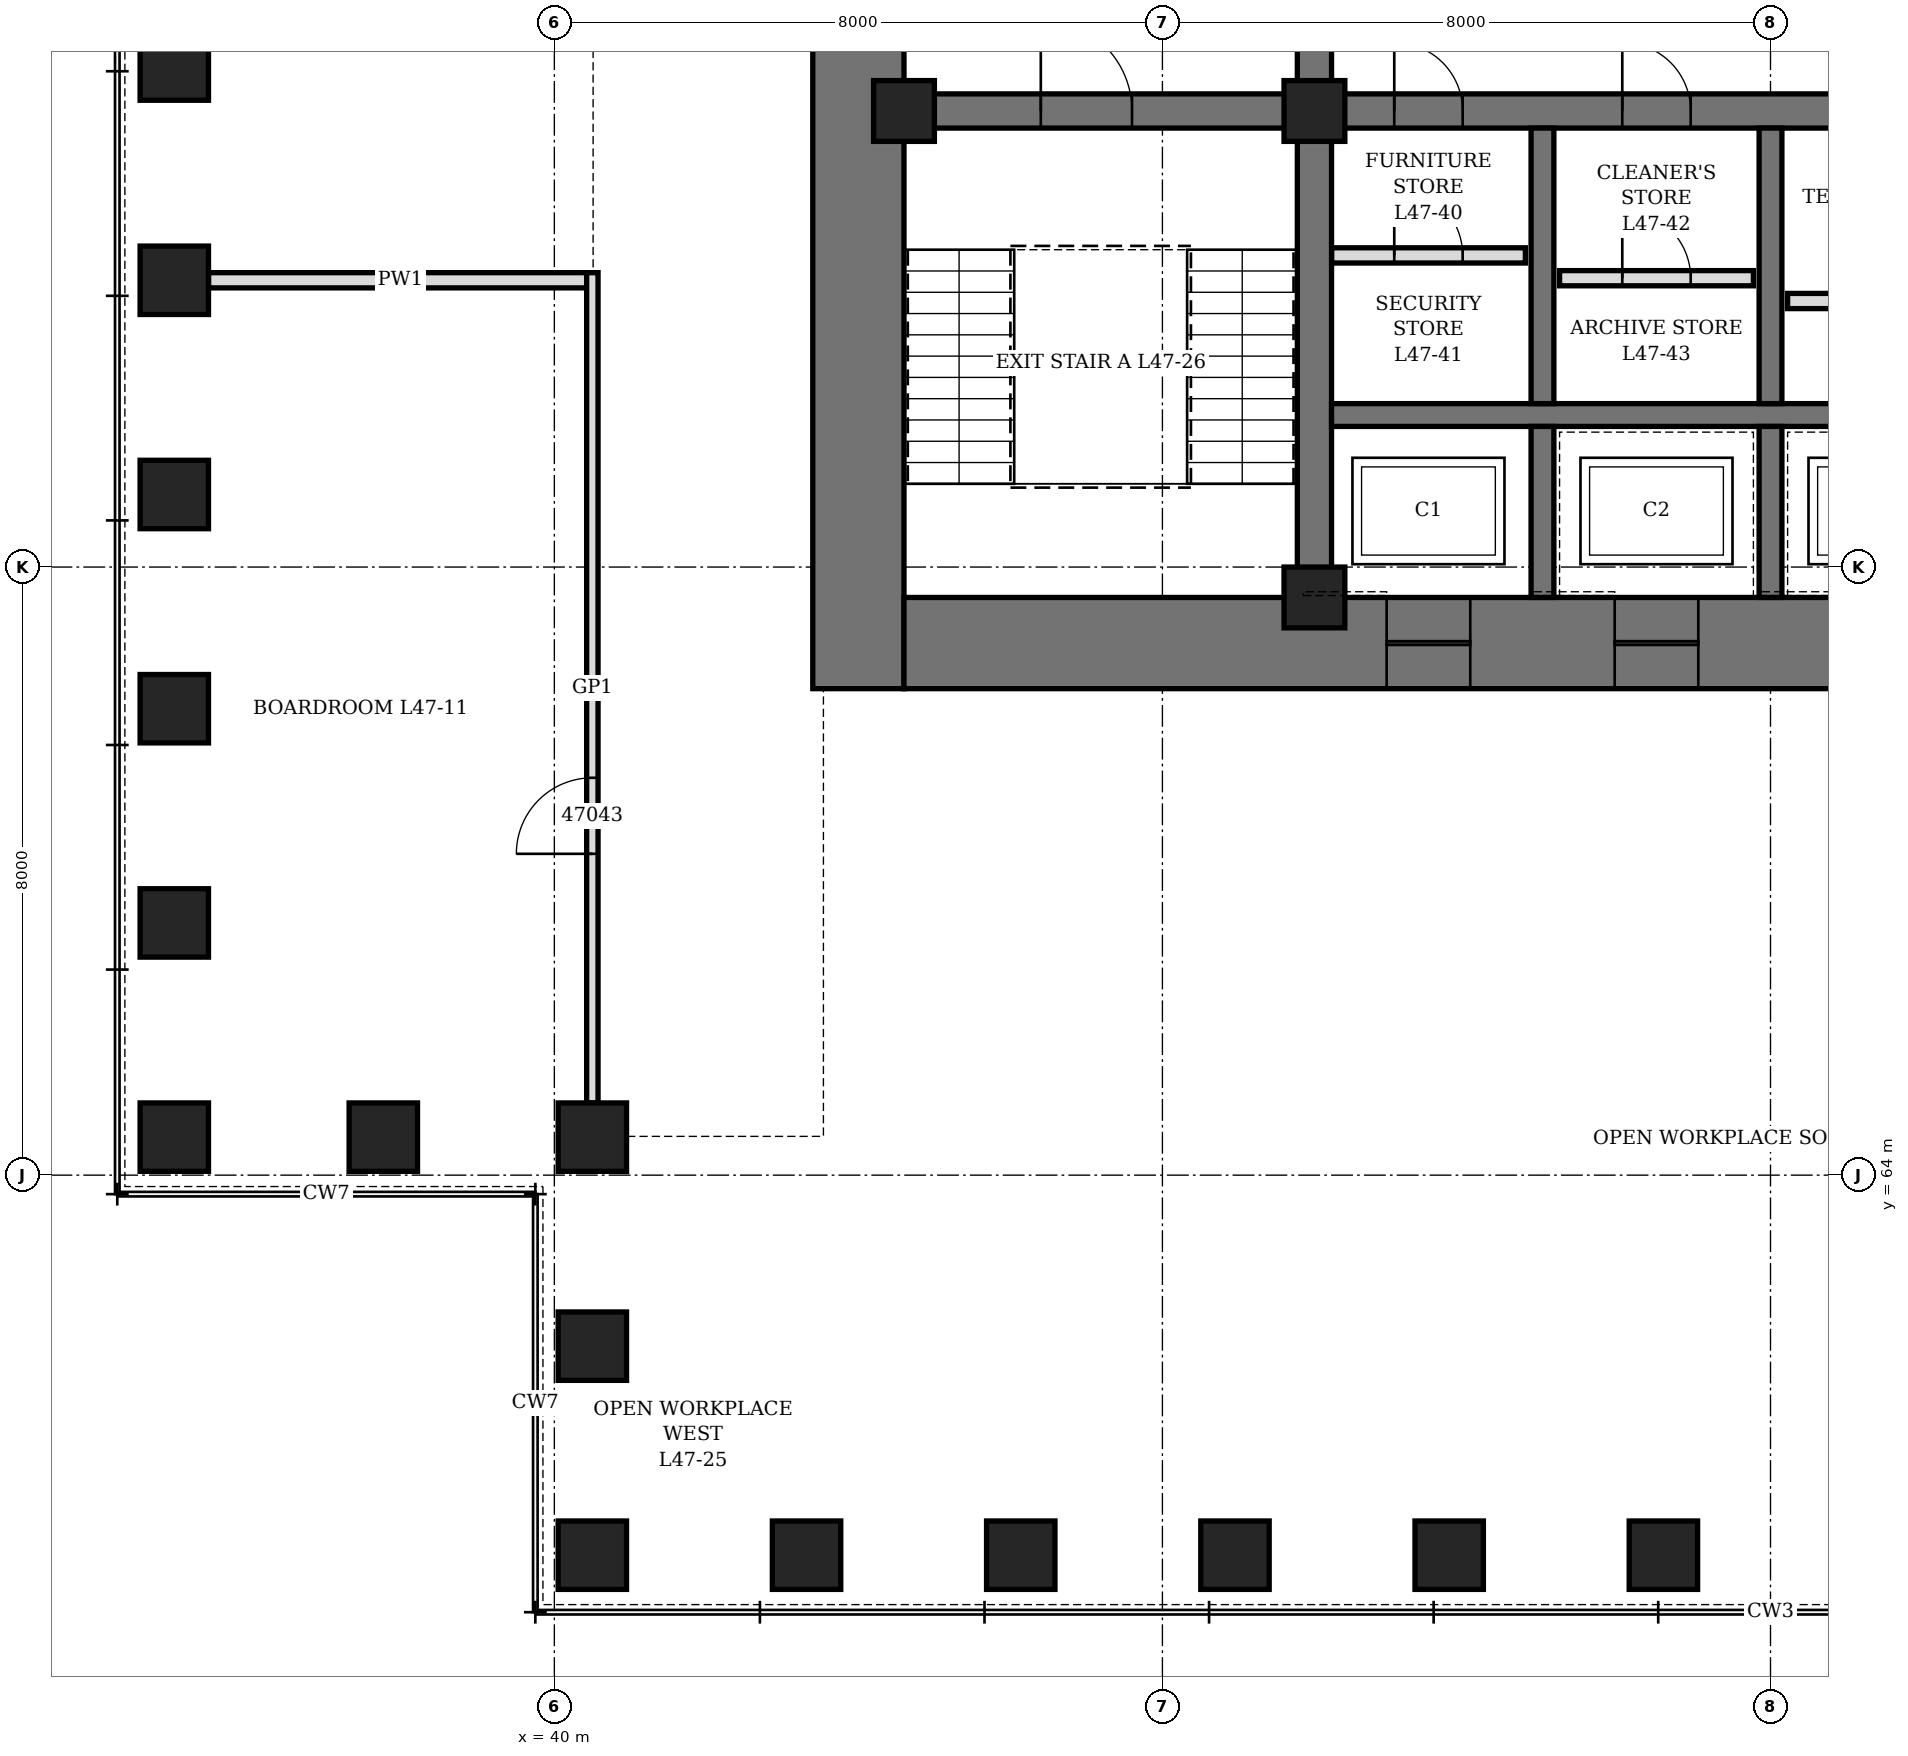
"""IFC4 building model, lengths in metres.
Left out: names, types, materials, properties, quantities, classifications, styles, units other than length and angle.
Written with IfcOpenShell. Run it as: python <this file> out.ifc"""

import sys

from ifc_helpers import new_model, si_unit, direction, frame, frame_2d, origin, origin_2d, place, context, subcontext, project, spatial, rectangle, hollow_rectangle, extrude, element, fill, save


model = new_model("IFC4")
c1 = context("Model", 3, precision=1e-05, world=origin(), true_north=direction((0.0, 1.0)))
c2 = subcontext(c1, "Body", "Model", "MODEL_VIEW")
j1 = project(units=[si_unit("LENGTHUNIT", "METRE"), si_unit("PLANEANGLEUNIT", "RADIAN")], contexts=[c1])
p1 = place(None, origin())
s1 = spatial("IfcSite", under=j1, at=p1, CompositionType="ELEMENT")
p2 = place(p1, origin())
s2 = spatial("IfcBuilding", under=s1, at=p2, CompositionType="ELEMENT")
p3 = place(p2, frame((0.0, 0.0, 210.7)))
s3 = spatial("IfcBuildingStorey", under=s2, at=p3, CompositionType="ELEMENT", Elevation=210.7)
for number, where, z_axis, x_axis in (
    (1, (40.5, 59.0, 0.0), (0.0, 0.0, 1.0), (1.0, 0.0, 0.0)),
    (2, (43.318, 59.0, 0.0), (0.0, 0.0, 1.0), (1.0, 0.0, 0.0)),
    (3, (46.136, 59.0, 0.0), (0.0, 0.0, 1.0), (1.0, 0.0, 0.0)),
    (4, (48.955, 59.0, 0.0), (0.0, 0.0, 1.0), (1.0, 0.0, 0.0)),
    (5, (51.773, 59.0, 0.0), (0.0, 0.0, 1.0), (1.0, 0.0, 0.0)),
    (6, (54.591, 59.0, 0.0), (0.0, 0.0, 1.0), (1.0, 0.0, 0.0)),
    (7, (35.0, 78.591, 0.0), (0.0, 0.0, 1.0), (0.0, 1.0, 0.0)),
    (8, (35.0, 75.773, 0.0), (0.0, 0.0, 1.0), (0.0, 1.0, 0.0)),
    (9, (35.0, 72.955, 0.0), (0.0, 0.0, 1.0), (0.0, 1.0, 0.0)),
    (10, (35.0, 70.136, 0.0), (0.0, 0.0, 1.0), (0.0, 1.0, 0.0)),
    (11, (35.0, 67.318, 0.0), (0.0, 0.0, 1.0), (0.0, 1.0, 0.0)),
    (12, (35.0, 64.5, 0.0), (0.0, 0.0, 1.0), (1.0, 0.0, 0.0)),
    (13, (37.75, 64.5, 0.0), (0.0, 0.0, 1.0), (1.0, 0.0, 0.0)),
    (14, (40.5, 64.5, 0.0), (0.0, 0.0, 1.0), (0.0, 1.0, 0.0)),
    (15, (40.5, 61.75, 0.0), (0.0, 0.0, 1.0), (0.0, 1.0, 0.0)),
):
    element("IfcColumn", number, at=place(p3, frame(where, z_axis=z_axis, x_axis=x_axis)), inside=s3, PredefinedType="COLUMN", context=c2, shape_type="SweptSolid", body=[
        extrude(hollow_rectangle(XDim=0.9, YDim=0.9, WallThickness=0.12, at=origin_2d()), origin(), (0.0, 0.0, 1.0), 4.2),
    ])
p4 = place(p3, frame((44.0, 70.4, 0.0), z_axis=(0.0, 0.0, 1.0), x_axis=(0.0, 1.0, 0.0)))
e16 = element("IfcWall", 16, at=p4, inside=s3, PredefinedType="SHEAR", context=c2, shape_type="SweptSolid", body=[
    extrude(rectangle(XDim=19.2, YDim=1.2, at=frame_2d((9.6, 0.0))), origin(), (0.0, 0.0, 1.0), 4.2),
])
p5 = place(p4, frame((8.6, 0.0, 0.0)))
e17 = element("IfcOpeningElement", 17, at=p5, cuts=e16, PredefinedType="OPENING", context=c2, shape_type="SweptSolid", body=[
    extrude(rectangle(XDim=2.0, YDim=2.4, at=frame_2d((1.0, 1.2))), frame((0.0, 0.61, 0.0), z_axis=(0.0, -1.0, 0.0), x_axis=(1.0, 0.0, 0.0)), (0.0, 0.0, 1.0), 1.22),
])
p6 = place(p3, frame((44.6, 71.0, 0.0), z_axis=(0.0, 0.0, 1.0), x_axis=(1.0, 0.0, 0.0)))
e18 = element("IfcWall", 18, at=p6, inside=s3, PredefinedType="SHEAR", context=c2, shape_type="SweptSolid", body=[
    extrude(rectangle(XDim=22.8, YDim=1.2, at=frame_2d((11.4, 0.0))), origin(), (0.0, 0.0, 1.0), 4.2),
])
p7 = place(p6, frame((6.35, 0.0, 0.0)))
e19 = element("IfcOpeningElement", 19, at=p7, cuts=e18, PredefinedType="OPENING", context=c2, shape_type="SweptSolid", body=[
    extrude(rectangle(XDim=1.1, YDim=2.2, at=frame_2d((0.55, 1.1))), frame((0.0, 0.61, 0.0), z_axis=(0.0, -1.0, 0.0), x_axis=(1.0, 0.0, 0.0)), (0.0, 0.0, 1.0), 1.22),
])
p8 = place(p6, frame((9.35, 0.0, 0.0)))
e20 = element("IfcOpeningElement", 20, at=p8, cuts=e18, PredefinedType="OPENING", context=c2, shape_type="SweptSolid", body=[
    extrude(rectangle(XDim=1.1, YDim=2.2, at=frame_2d((0.55, 1.1))), frame((0.0, 0.61, 0.0), z_axis=(0.0, -1.0, 0.0), x_axis=(1.0, 0.0, 0.0)), (0.0, 0.0, 1.0), 1.22),
])
p9 = place(p6, frame((12.35, 0.0, 0.0)))
e21 = element("IfcOpeningElement", 21, at=p9, cuts=e18, PredefinedType="OPENING", context=c2, shape_type="SweptSolid", body=[
    extrude(rectangle(XDim=1.1, YDim=2.2, at=frame_2d((0.55, 1.1))), frame((0.0, 0.61, 0.0), z_axis=(0.0, -1.0, 0.0), x_axis=(1.0, 0.0, 0.0)), (0.0, 0.0, 1.0), 1.22),
])
p10 = place(p6, frame((15.35, 0.0, 0.0)))
e22 = element("IfcOpeningElement", 22, at=p10, cuts=e18, PredefinedType="OPENING", context=c2, shape_type="SweptSolid", body=[
    extrude(rectangle(XDim=1.1, YDim=2.2, at=frame_2d((0.55, 1.1))), frame((0.0, 0.61, 0.0), z_axis=(0.0, -1.0, 0.0), x_axis=(1.0, 0.0, 0.0)), (0.0, 0.0, 1.0), 1.22),
])
p11 = place(p3, frame((50.0, 71.6, 0.0), z_axis=(0.0, 0.0, 1.0), x_axis=(0.0, 1.0, 0.0)))
e23 = element("IfcWall", 23, at=p11, inside=s3, PredefinedType="SHEAR", context=c2, shape_type="SweptSolid", body=[
    extrude(rectangle(XDim=16.8, YDim=0.45, at=frame_2d((8.4, 0.0))), origin(), (0.0, 0.0, 1.0), 4.2),
])
p12 = place(p11, frame((7.5, 0.0, 0.0)))
e24 = element("IfcOpeningElement", 24, at=p12, cuts=e23, PredefinedType="OPENING", context=c2, shape_type="SweptSolid", body=[
    extrude(rectangle(XDim=1.8, YDim=2.4, at=frame_2d((0.9, 1.2))), frame((0.0, 0.235, 0.0), z_axis=(0.0, -1.0, 0.0), x_axis=(1.0, 0.0, 0.0)), (0.0, 0.0, 1.0), 0.47),
])
p13 = place(p3, frame((44.6, 78.0, 0.0), z_axis=(0.0, 0.0, 1.0), x_axis=(1.0, 0.0, 0.0)))
e25 = element("IfcWall", 25, at=p13, inside=s3, PredefinedType="SHEAR", context=c2, shape_type="SweptSolid", body=[
    extrude(rectangle(XDim=5.175, YDim=0.45, at=frame_2d((2.587, 0.0))), origin(), (0.0, 0.0, 1.0), 4.2),
])
p14 = place(p13, frame((1.8, 0.0, 0.0)))
e26 = element("IfcOpeningElement", 26, at=p14, cuts=e25, PredefinedType="OPENING", context=c2, shape_type="SweptSolid", body=[
    extrude(rectangle(XDim=1.2, YDim=2.1, at=frame_2d((0.6, 1.05))), frame((0.0, 0.235, 0.0), z_axis=(0.0, -1.0, 0.0), x_axis=(1.0, 0.0, 0.0)), (0.0, 0.0, 1.0), 0.47),
])
p15 = place(p3, frame((50.225, 78.0, 0.0), z_axis=(0.0, 0.0, 1.0), x_axis=(1.0, 0.0, 0.0)))
e27 = element("IfcWall", 27, at=p15, inside=s3, PredefinedType="SHEAR", context=c2, shape_type="SweptSolid", body=[
    extrude(rectangle(XDim=11.55, YDim=0.45, at=frame_2d((5.775, 0.0))), origin(), (0.0, 0.0, 1.0), 4.2),
])
p16 = place(p15, frame((0.825, 0.0, 0.0)))
e28 = element("IfcOpeningElement", 28, at=p16, cuts=e27, PredefinedType="OPENING", context=c2, shape_type="SweptSolid", body=[
    extrude(rectangle(XDim=0.9, YDim=2.1, at=frame_2d((0.45, 1.05))), frame((0.0, 0.235, 0.0), z_axis=(0.0, -1.0, 0.0), x_axis=(1.0, 0.0, 0.0)), (0.0, 0.0, 1.0), 0.47),
])
p17 = place(p15, frame((3.825, 0.0, 0.0)))
e29 = element("IfcOpeningElement", 29, at=p17, cuts=e27, PredefinedType="OPENING", context=c2, shape_type="SweptSolid", body=[
    extrude(rectangle(XDim=0.9, YDim=2.1, at=frame_2d((0.45, 1.05))), frame((0.0, 0.235, 0.0), z_axis=(0.0, -1.0, 0.0), x_axis=(1.0, 0.0, 0.0)), (0.0, 0.0, 1.0), 0.47),
])
p18 = place(p15, frame((6.825, 0.0, 0.0)))
e30 = element("IfcOpeningElement", 30, at=p18, cuts=e27, PredefinedType="OPENING", context=c2, shape_type="SweptSolid", body=[
    extrude(rectangle(XDim=0.9, YDim=2.1, at=frame_2d((0.45, 1.05))), frame((0.0, 0.235, 0.0), z_axis=(0.0, -1.0, 0.0), x_axis=(1.0, 0.0, 0.0)), (0.0, 0.0, 1.0), 0.47),
])
p19 = place(p15, frame((9.825, 0.0, 0.0)))
e31 = element("IfcOpeningElement", 31, at=p19, cuts=e27, PredefinedType="OPENING", context=c2, shape_type="SweptSolid", body=[
    extrude(rectangle(XDim=0.9, YDim=2.1, at=frame_2d((0.45, 1.05))), frame((0.0, 0.235, 0.0), z_axis=(0.0, -1.0, 0.0), x_axis=(1.0, 0.0, 0.0)), (0.0, 0.0, 1.0), 0.47),
])
p20 = place(p3, frame((50.225, 74.0, 0.0), z_axis=(0.0, 0.0, 1.0), x_axis=(1.0, 0.0, 0.0)))
e32 = element("IfcWall", 32, at=p20, inside=s3, PredefinedType="SHEAR", context=c2, shape_type="SweptSolid", body=[
    extrude(rectangle(XDim=11.55, YDim=0.3, at=frame_2d((5.775, 0.0))), origin(), (0.0, 0.0, 1.0), 4.2),
])
p21 = place(p3, frame((53.0, 71.6, 0.0), z_axis=(0.0, 0.0, 1.0), x_axis=(0.0, 1.0, 0.0)))
e33 = element("IfcWall", 33, at=p21, inside=s3, PredefinedType="SHEAR", context=c2, shape_type="SweptSolid", body=[
    extrude(rectangle(XDim=2.25, YDim=0.3, at=frame_2d((1.125, 0.0))), origin(), (0.0, 0.0, 1.0), 4.2),
])
p22 = place(p3, frame((53.0, 74.15, 0.0), z_axis=(0.0, 0.0, 1.0), x_axis=(0.0, 1.0, 0.0)))
e34 = element("IfcWall", 34, at=p22, inside=s3, PredefinedType="SHEAR", context=c2, shape_type="SweptSolid", body=[
    extrude(rectangle(XDim=3.625, YDim=0.3, at=frame_2d((1.812, 0.0))), origin(), (0.0, 0.0, 1.0), 4.2),
])
p23 = place(p3, frame((56.0, 71.6, 0.0), z_axis=(0.0, 0.0, 1.0), x_axis=(0.0, 1.0, 0.0)))
e35 = element("IfcWall", 35, at=p23, inside=s3, PredefinedType="SHEAR", context=c2, shape_type="SweptSolid", body=[
    extrude(rectangle(XDim=2.25, YDim=0.3, at=frame_2d((1.125, 0.0))), origin(), (0.0, 0.0, 1.0), 4.2),
])
p24 = place(p3, frame((56.0, 74.15, 0.0), z_axis=(0.0, 0.0, 1.0), x_axis=(0.0, 1.0, 0.0)))
e36 = element("IfcWall", 36, at=p24, inside=s3, PredefinedType="SHEAR", context=c2, shape_type="SweptSolid", body=[
    extrude(rectangle(XDim=3.625, YDim=0.3, at=frame_2d((1.812, 0.0))), origin(), (0.0, 0.0, 1.0), 4.2),
])
for number, where, z_axis, x_axis in (
    (37, (44.6, 78.0, 0.0), (0.0, 0.0, 1.0), (1.0, 0.0, 0.0)),
    (38, (50.0, 71.6, 0.0), (0.0, 0.0, 1.0), (1.0, 0.0, 0.0)),
    (39, (50.0, 78.0, 0.0), (0.0, 0.0, 1.0), (1.0, 0.0, 0.0)),
):
    element("IfcColumn", number, at=place(p3, frame(where, z_axis=z_axis, x_axis=x_axis)), inside=s3, PredefinedType="COLUMN", context=c2, shape_type="SweptSolid", body=[
        extrude(hollow_rectangle(XDim=0.8, YDim=0.8, WallThickness=0.1, at=origin_2d()), origin(), (0.0, 0.0, 1.0), 4.2),
    ])
p25 = place(p3, frame((50.225, 76.1, 0.0), z_axis=(0.0, 0.0, 1.0), x_axis=(1.0, 0.0, 0.0)))
e40 = element("IfcWall", 40, at=p25, inside=s3, PredefinedType="PARTITIONING", context=c2, shape_type="SweptSolid", body=[
    extrude(rectangle(XDim=2.55, YDim=0.2, at=frame_2d((1.275, 0.0))), origin(), (0.0, 0.0, 1.0), 4.04),
])
p26 = place(p25, frame((0.825, 0.0, 0.0)))
e41 = element("IfcOpeningElement", 41, at=p26, cuts=e40, PredefinedType="OPENING", context=c2, shape_type="SweptSolid", body=[
    extrude(rectangle(XDim=0.9, YDim=2.1, at=frame_2d((0.45, 1.05))), frame((0.0, 0.11, 0.0), z_axis=(0.0, -1.0, 0.0), x_axis=(1.0, 0.0, 0.0)), (0.0, 0.0, 1.0), 0.22),
])
p27 = place(p3, frame((53.225, 75.8, 0.0), z_axis=(0.0, 0.0, 1.0), x_axis=(1.0, 0.0, 0.0)))
e42 = element("IfcWall", 42, at=p27, inside=s3, PredefinedType="PARTITIONING", context=c2, shape_type="SweptSolid", body=[
    extrude(rectangle(XDim=2.55, YDim=0.2, at=frame_2d((1.275, 0.0))), origin(), (0.0, 0.0, 1.0), 4.04),
])
p28 = place(p27, frame((0.825, 0.0, 0.0)))
e43 = element("IfcOpeningElement", 43, at=p28, cuts=e42, PredefinedType="OPENING", context=c2, shape_type="SweptSolid", body=[
    extrude(rectangle(XDim=0.9, YDim=2.1, at=frame_2d((0.45, 1.05))), frame((0.0, 0.11, 0.0), z_axis=(0.0, -1.0, 0.0), x_axis=(1.0, 0.0, 0.0)), (0.0, 0.0, 1.0), 0.22),
])
p29 = place(p3, frame((56.225, 75.5, 0.0), z_axis=(0.0, 0.0, 1.0), x_axis=(1.0, 0.0, 0.0)))
e44 = element("IfcWall", 44, at=p29, inside=s3, PredefinedType="PARTITIONING", context=c2, shape_type="SweptSolid", body=[
    extrude(rectangle(XDim=2.55, YDim=0.2, at=frame_2d((1.275, 0.0))), origin(), (0.0, 0.0, 1.0), 4.04),
])
p30 = place(p29, frame((0.825, 0.0, 0.0)))
e45 = element("IfcOpeningElement", 45, at=p30, cuts=e44, PredefinedType="OPENING", context=c2, shape_type="SweptSolid", body=[
    extrude(rectangle(XDim=0.9, YDim=2.1, at=frame_2d((0.45, 1.05))), frame((0.0, 0.11, 0.0), z_axis=(0.0, -1.0, 0.0), x_axis=(1.0, 0.0, 0.0)), (0.0, 0.0, 1.0), 0.22),
])
p31 = place(p3, frame((35.45, 75.773, 0.0), z_axis=(0.0, 0.0, 1.0), x_axis=(1.0, 0.0, 0.0)))
e46 = element("IfcWall", 46, at=p31, inside=s3, PredefinedType="PARTITIONING", context=c2, shape_type="SweptSolid", body=[
    extrude(rectangle(XDim=5.05, YDim=0.2, at=frame_2d((2.525, 0.0))), origin(), (0.0, 0.0, 1.0), 3.428),
])
p32 = place(p3, frame((40.5, 64.95, 0.0), z_axis=(0.0, 0.0, 1.0), x_axis=(0.0, 1.0, 0.0)))
e47 = element("IfcWall", 47, at=p32, inside=s3, PredefinedType="PARTITIONING", context=c2, shape_type="SweptSolid", body=[
    extrude(rectangle(XDim=10.923, YDim=0.15, at=frame_2d((5.461, 0.0))), origin(), (0.0, 0.0, 1.0), 4.04),
])
p33 = place(p32, frame((3.277, 0.0, 0.0)))
e48 = element("IfcOpeningElement", 48, at=p33, cuts=e47, PredefinedType="OPENING", context=c2, shape_type="SweptSolid", body=[
    extrude(rectangle(XDim=1.0, YDim=2.4, at=frame_2d((0.5, 1.2))), frame((0.0, 0.085, 0.0), z_axis=(0.0, -1.0, 0.0), x_axis=(1.0, 0.0, 0.0)), (0.0, 0.0, 1.0), 0.17),
])
p34 = place(p16, origin())
e49 = element("IfcDoor", 49, at=p34, inside=s3, OperationType="SINGLE_SWING_LEFT", PredefinedType="DOOR", context=c2, shape_type="SweptSolid", body=[
    extrude(rectangle(XDim=0.9, YDim=2.1, at=frame_2d((0.45, 1.05))), frame((0.0, 0.225, 0.0), z_axis=(0.0, -1.0, 0.0), x_axis=(1.0, 0.0, 0.0)), (0.0, 0.0, 1.0), 0.449),
])
fill(e28, e49)
p35 = place(p26, origin())
e50 = element("IfcDoor", 50, at=p35, inside=s3, OperationType="SINGLE_SWING_LEFT", PredefinedType="DOOR", context=c2, shape_type="SweptSolid", body=[
    extrude(rectangle(XDim=0.9, YDim=2.1, at=frame_2d((0.45, 1.05))), frame((0.0, 0.1, 0.0), z_axis=(0.0, -1.0, 0.0), x_axis=(1.0, 0.0, 0.0)), (0.0, 0.0, 1.0), 0.199),
])
fill(e41, e50)
p36 = place(p17, origin())
e51 = element("IfcDoor", 51, at=p36, inside=s3, OperationType="SINGLE_SWING_LEFT", PredefinedType="DOOR", context=c2, shape_type="SweptSolid", body=[
    extrude(rectangle(XDim=0.9, YDim=2.1, at=frame_2d((0.45, 1.05))), frame((0.0, 0.225, 0.0), z_axis=(0.0, -1.0, 0.0), x_axis=(1.0, 0.0, 0.0)), (0.0, 0.0, 1.0), 0.449),
])
fill(e29, e51)
p37 = place(p28, origin())
e52 = element("IfcDoor", 52, at=p37, inside=s3, OperationType="SINGLE_SWING_LEFT", PredefinedType="DOOR", context=c2, shape_type="SweptSolid", body=[
    extrude(rectangle(XDim=0.9, YDim=2.1, at=frame_2d((0.45, 1.05))), frame((0.0, 0.1, 0.0), z_axis=(0.0, -1.0, 0.0), x_axis=(1.0, 0.0, 0.0)), (0.0, 0.0, 1.0), 0.199),
])
fill(e43, e52)
p38 = place(p14, origin())
e53 = element("IfcDoor", 53, at=p38, inside=s3, OperationType="SINGLE_SWING_LEFT", PredefinedType="DOOR", context=c2, shape_type="SweptSolid", body=[
    extrude(rectangle(XDim=1.2, YDim=2.1, at=frame_2d((0.6, 1.05))), frame((0.0, 0.225, 0.0), z_axis=(0.0, -1.0, 0.0), x_axis=(1.0, 0.0, 0.0)), (0.0, 0.0, 1.0), 0.449),
])
fill(e26, e53)
p39 = place(p7, origin())
e54 = element("IfcDoor", 54, at=p39, inside=s3, OperationType="SLIDING_TO_LEFT", PredefinedType="DOOR", context=c2, shape_type="SweptSolid", body=[
    extrude(rectangle(XDim=1.1, YDim=2.2, at=frame_2d((0.55, 1.1))), frame((0.0, 0.35, 0.0), z_axis=(0.0, -1.0, 0.0), x_axis=(1.0, 0.0, 0.0)), (0.0, 0.0, 1.0), 0.7),
])
fill(e19, e54)
p40 = place(p8, origin())
e55 = element("IfcDoor", 55, at=p40, inside=s3, OperationType="SLIDING_TO_LEFT", PredefinedType="DOOR", context=c2, shape_type="SweptSolid", body=[
    extrude(rectangle(XDim=1.1, YDim=2.2, at=frame_2d((0.55, 1.1))), frame((0.0, 0.35, 0.0), z_axis=(0.0, -1.0, 0.0), x_axis=(1.0, 0.0, 0.0)), (0.0, 0.0, 1.0), 0.7),
])
fill(e20, e55)
p41 = place(p33, origin())
e56 = element("IfcDoor", 56, at=p41, inside=s3, OperationType="SINGLE_SWING_RIGHT", PredefinedType="DOOR", context=c2, shape_type="SweptSolid", body=[
    extrude(rectangle(XDim=1.0, YDim=2.4, at=frame_2d((0.5, 1.2))), frame((0.0, 0.075, 0.0), z_axis=(0.0, -1.0, 0.0), x_axis=(1.0, 0.0, 0.0)), (0.0, 0.0, 1.0), 0.149),
])
fill(e48, e56)
save(model, sys.argv[1])
